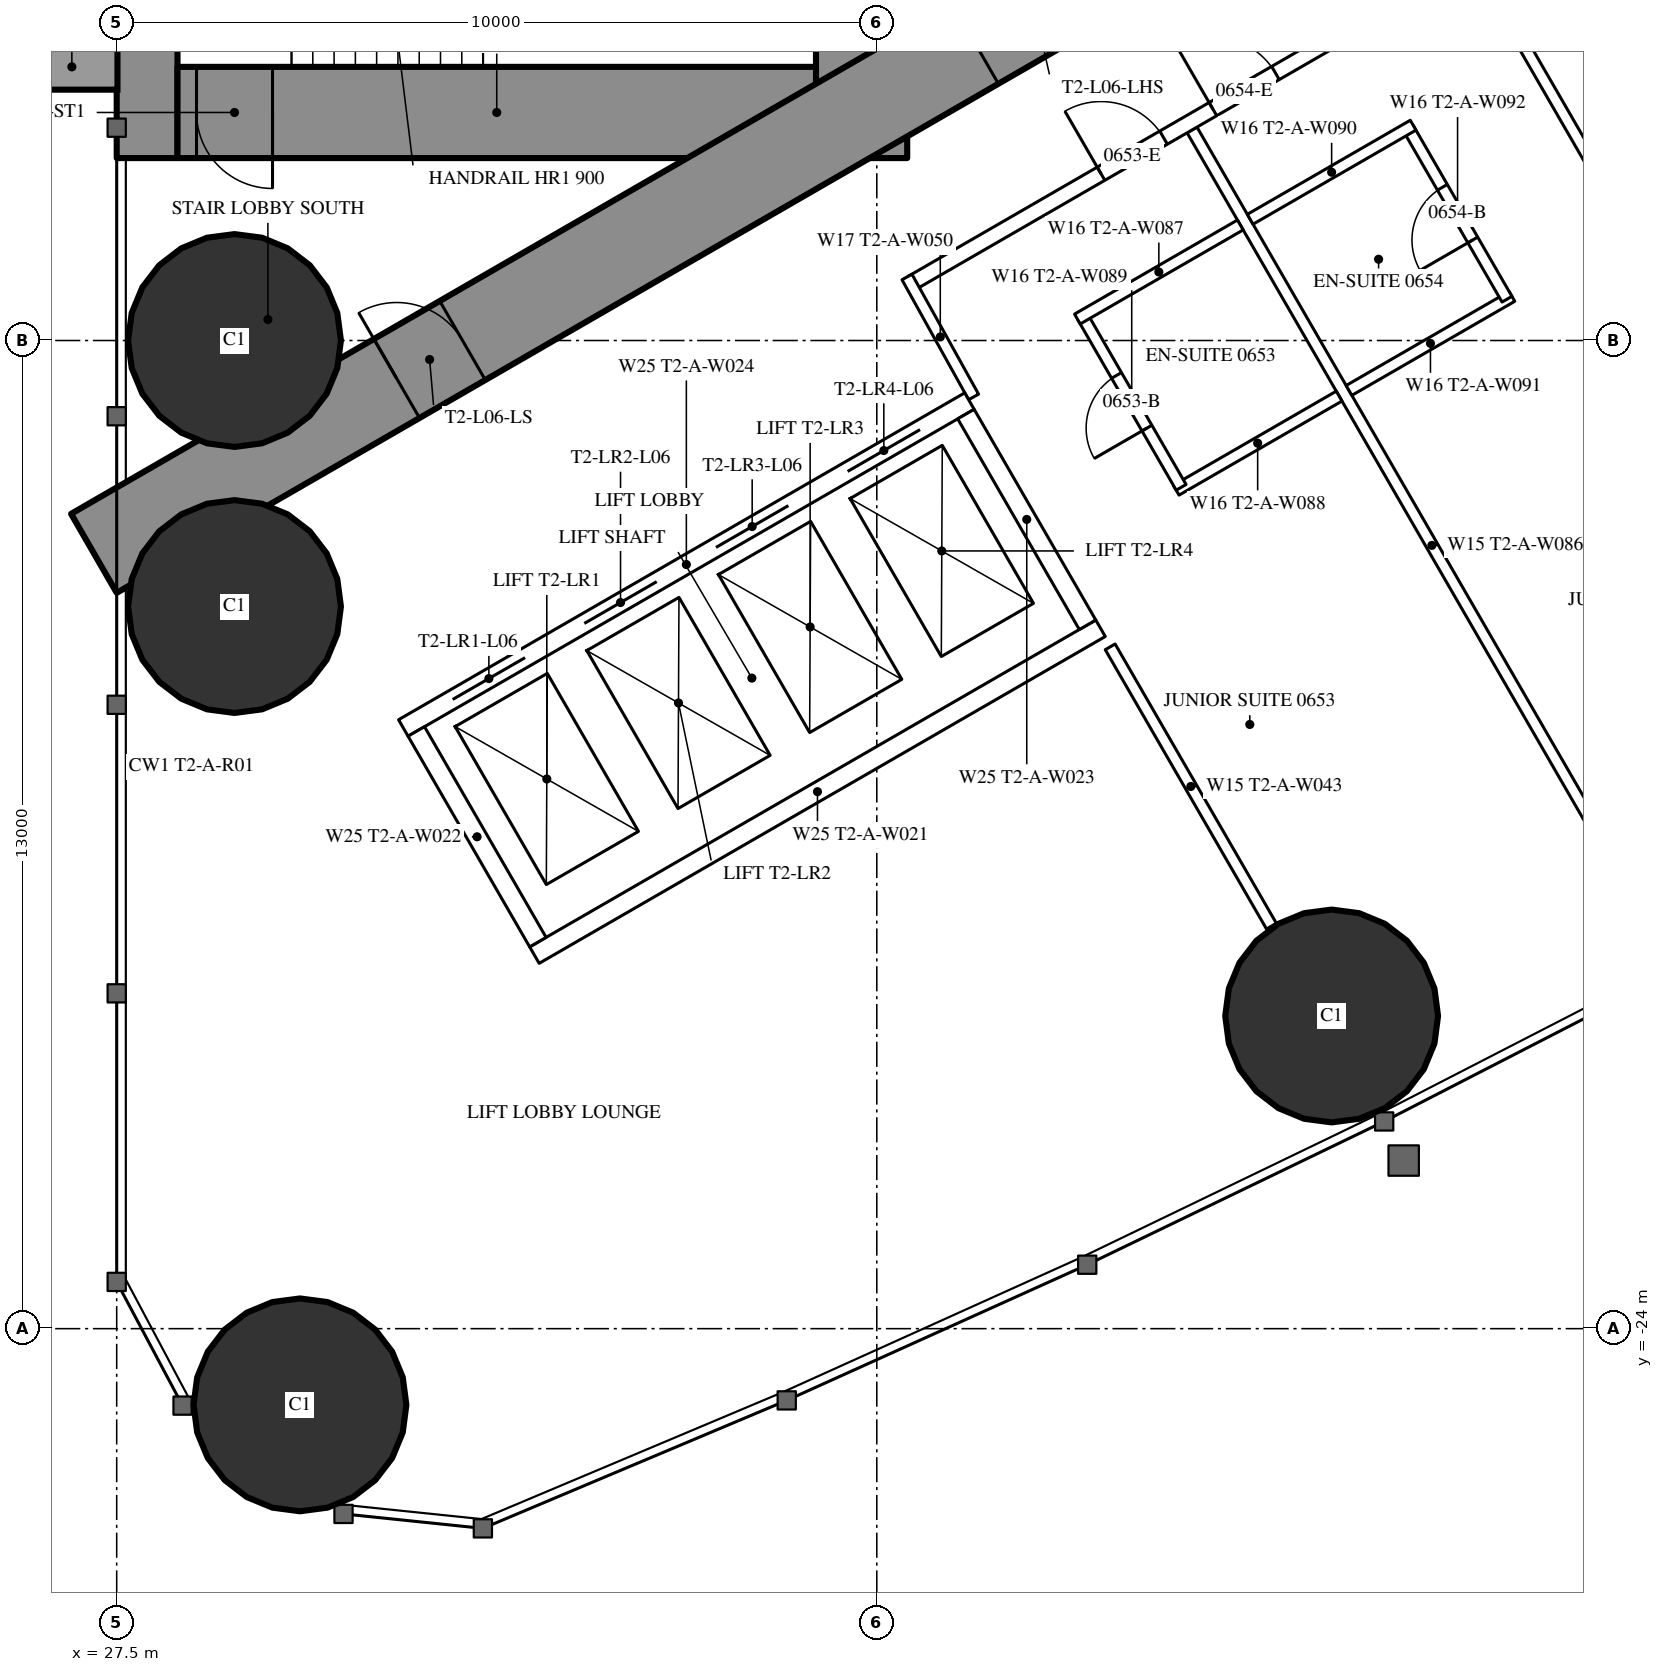
"""IFC4 building model, lengths in metres.
Left out: names, types, materials, properties, quantities, classifications, styles, units other than length and angle.
Written with IfcOpenShell. Run it as: python <this file> out.ifc"""

import sys

from ifc_helpers import new_model, si_unit, direction, frame, frame_2d, origin, origin_2d, place, context, subcontext, project, spatial, rectangle, hollow_circle, extrude, element, fill, save


model = new_model("IFC4")
c1 = context("Model", 3, precision=1e-05, world=origin(), true_north=direction((0.0, 1.0)))
c2 = subcontext(c1, "Body", "Model", "MODEL_VIEW")
j1 = project(units=[si_unit("LENGTHUNIT", "METRE"), si_unit("PLANEANGLEUNIT", "RADIAN")], contexts=[c1])
p1 = place(None, origin())
s1 = spatial("IfcSite", under=j1, at=p1, CompositionType="ELEMENT")
p2 = place(p1, origin())
s2 = spatial("IfcBuilding", under=s1, at=p2, CompositionType="ELEMENT")
p3 = place(p2, frame((0.0, 0.0, 28.5)))
s3 = spatial("IfcBuildingStorey", under=s2, at=p3, CompositionType="ELEMENT", Elevation=28.5)
for number, where, z_axis, x_axis in (
    (1, (29.911, -25.002, 0.0), (0.0, 0.0, 1.0), (1.0, 0.0, 0.0)),
    (2, (29.05, -11.0, 0.0), (0.0, 0.0, 1.0), (1.0, 0.0, 0.0)),
    (3, (29.05, -14.5, 0.0), (0.0, 0.0, 1.0), (1.0, 0.0, 0.0)),
    (4, (43.484, -19.886, 0.0), (0.0, 0.0, 1.0), (1.0, 0.0, 0.0)),
):
    element("IfcColumn", number, at=place(p3, frame(where, z_axis=z_axis, x_axis=x_axis)), inside=s3, PredefinedType="COLUMN", context=c2, shape_type="SweptSolid", body=[
        extrude(hollow_circle(Radius=1.4, WallThickness=0.12, at=origin_2d()), origin(), (0.0, 0.0, 1.0), 3.5),
    ])
p4 = place(p3, frame((27.9, -8.6, 0.0), z_axis=(0.0, 0.0, 1.0), x_axis=(0.0, 1.0, 0.0)))
e5 = element("IfcWall", 5, at=p4, inside=s3, PredefinedType="SHEAR", context=c2, shape_type="SweptSolid", body=[
    extrude(rectangle(XDim=17.2, YDim=0.8, at=frame_2d((8.6, 0.0))), origin(), (0.0, 0.0, 1.0), 3.5),
])
p5 = place(p4, frame((2.45, 0.0, 0.6)))
e6 = element("IfcOpeningElement", 6, at=p5, cuts=e5, PredefinedType="OPENING", context=c2, shape_type="SweptSolid", body=[
    extrude(rectangle(XDim=0.6, YDim=2.1, at=frame_2d((0.3, 1.05))), frame((0.0, 0.41, 0.0), z_axis=(0.0, -1.0, 0.0), x_axis=(1.0, 0.0, 0.0)), (0.0, 0.0, 1.0), 0.82),
])
p6 = place(p4, frame((14.15, 0.0, 0.6)))
e7 = element("IfcOpeningElement", 7, at=p6, cuts=e5, PredefinedType="OPENING", context=c2, shape_type="SweptSolid", body=[
    extrude(rectangle(XDim=0.6, YDim=2.1, at=frame_2d((0.3, 1.05))), frame((0.0, 0.41, 0.0), z_axis=(0.0, -1.0, 0.0), x_axis=(1.0, 0.0, 0.0)), (0.0, 0.0, 1.0), 0.82),
])
p7 = place(p3, frame((37.3, -8.6, 0.0), z_axis=(0.0, 0.0, 1.0), x_axis=(0.0, 1.0, 0.0)))
e8 = element("IfcWall", 8, at=p7, inside=s3, PredefinedType="SHEAR", context=c2, shape_type="SweptSolid", body=[
    extrude(rectangle(XDim=17.2, YDim=1.2, at=frame_2d((8.6, 0.0))), origin(), (0.0, 0.0, 1.0), 3.5),
])
p8 = place(p7, frame((7.7, 0.0, 0.0)))
e9 = element("IfcOpeningElement", 9, at=p8, cuts=e8, PredefinedType="OPENING", context=c2, shape_type="SweptSolid", body=[
    extrude(rectangle(XDim=1.8, YDim=2.2, at=frame_2d((0.9, 1.1))), frame((0.0, 0.61, 0.0), z_axis=(0.0, -1.0, 0.0), x_axis=(1.0, 0.0, 0.0)), (0.0, 0.0, 1.0), 1.22),
])
p9 = place(p3, frame((28.3, -8.0, 0.0), z_axis=(0.0, 0.0, 1.0), x_axis=(1.0, 0.0, 0.0)))
e10 = element("IfcWall", 10, at=p9, inside=s3, PredefinedType="SHEAR", context=c2, shape_type="SweptSolid", body=[
    extrude(rectangle(XDim=8.4, YDim=1.2, at=frame_2d((4.2, 0.0))), origin(), (0.0, 0.0, 1.0), 3.5),
])
p10 = place(p9, frame((0.25, 0.0, 0.0)))
e11 = element("IfcOpeningElement", 11, at=p10, cuts=e10, PredefinedType="OPENING", context=c2, shape_type="SweptSolid", body=[
    extrude(rectangle(XDim=1.0, YDim=2.2, at=frame_2d((0.5, 1.1))), frame((0.0, 0.61, 0.0), z_axis=(0.0, -1.0, 0.0), x_axis=(1.0, 0.0, 0.0)), (0.0, 0.0, 1.0), 1.22),
])
p11 = place(p3, frame((27.2, -13.8, 0.0), z_axis=(0.0, 0.0, 1.0), x_axis=(0.866027159892, 0.499996958321, 0.0)))
e12 = element("IfcWall", 12, at=p11, inside=s3, PredefinedType="SHEAR", context=c2, shape_type="SweptSolid", body=[
    extrude(rectangle(XDim=27.947, YDim=1.2, at=frame_2d((13.973, 0.0))), origin(), (0.0, 0.0, 1.0), 3.5),
])
p12 = place(p11, frame((4.6, 0.0, 0.0)))
e13 = element("IfcOpeningElement", 13, at=p12, cuts=e12, PredefinedType="OPENING", context=c2, shape_type="SweptSolid", body=[
    extrude(rectangle(XDim=1.0, YDim=2.2, at=frame_2d((0.5, 1.1))), frame((0.0, 0.61, 0.0), z_axis=(0.0, -1.0, 0.0), x_axis=(1.0, 0.0, 0.0)), (0.0, 0.0, 1.0), 1.22),
])
p13 = place(p11, frame((13.395, 0.0, 0.0)))
e14 = element("IfcOpeningElement", 14, at=p13, cuts=e12, PredefinedType="OPENING", context=c2, shape_type="SweptSolid", body=[
    extrude(rectangle(XDim=1.8, YDim=2.2, at=frame_2d((0.9, 1.1))), frame((0.0, 0.61, 0.0), z_axis=(0.0, -1.0, 0.0), x_axis=(1.0, 0.0, 0.0)), (0.0, 0.0, 1.0), 1.22),
])
p14 = place(p3, frame((41.647, -8.23, 0.0), z_axis=(0.0, 0.0, 1.0), x_axis=(0.49998590462, -0.866033541603, 0.0)))
e15 = element("IfcWall", 15, at=p14, inside=s3, PredefinedType="PARTITIONING", context=c2, shape_type="SweptSolid", body=[
    extrude(rectangle(XDim=12.621, YDim=0.15, at=frame_2d((6.311, 0.0))), origin(), (0.0, 0.0, 1.0), 3.25),
])
p15 = place(p3, frame((45.403, -6.062, 0.0), z_axis=(0.0, 0.0, 1.0), x_axis=(0.500007077968, -0.866021317279, 0.0)))
e16 = element("IfcWall", 16, at=p15, inside=s3, PredefinedType="PARTITIONING", context=c2, shape_type="SweptSolid", body=[
    extrude(rectangle(XDim=12.721, YDim=0.15, at=frame_2d((6.361, 0.0))), origin(), (0.0, 0.0, 1.0), 3.25),
])
p16 = place(p3, frame((40.57, -15.03, 0.0), z_axis=(0.0, 0.0, 1.0), x_axis=(0.500012993597, -0.866017901798, 0.0)))
e17 = element("IfcWall", 17, at=p16, inside=s3, PredefinedType="PARTITIONING", context=c2, shape_type="SweptSolid", body=[
    extrude(rectangle(XDim=4.243, YDim=0.15, at=frame_2d((2.122, 0.0))), origin(), (0.0, 0.0, 1.0), 3.25),
])
p17 = place(p3, frame((37.96, -10.243, 0.0), z_axis=(0.0, 0.0, 1.0), x_axis=(0.866026429433, 0.499998223521, 0.0)))
e18 = element("IfcWall", 18, at=p17, inside=s3, PredefinedType="PARTITIONING", context=c2, shape_type="SweptSolid", body=[
    extrude(rectangle(XDim=20.487, YDim=0.2, at=frame_2d((10.243, 0.0))), origin(), (0.0, 0.0, 1.0), 3.25),
])
p18 = place(p17, frame((4.575, 0.0, 0.0)))
e19 = element("IfcOpeningElement", 19, at=p18, cuts=e18, PredefinedType="OPENING", context=c2, shape_type="SweptSolid", body=[
    extrude(rectangle(XDim=0.95, YDim=2.2, at=frame_2d((0.475, 1.1))), frame((0.0, 0.11, 0.0), z_axis=(0.0, -1.0, 0.0), x_axis=(1.0, 0.0, 0.0)), (0.0, 0.0, 1.0), 0.22),
])
p19 = place(p17, frame((9.199, 0.0, 0.0)))
e20 = element("IfcOpeningElement", 20, at=p19, cuts=e18, PredefinedType="OPENING", context=c2, shape_type="SweptSolid", body=[
    extrude(rectangle(XDim=0.95, YDim=2.2, at=frame_2d((0.475, 1.1))), frame((0.0, 0.11, 0.0), z_axis=(0.0, -1.0, 0.0), x_axis=(1.0, 0.0, 0.0)), (0.0, 0.0, 1.0), 0.22),
])
p20 = place(p17, frame((15.599, 0.0, 0.0)))
e21 = element("IfcOpeningElement", 21, at=p20, cuts=e18, PredefinedType="OPENING", context=c2, shape_type="SweptSolid", body=[
    extrude(rectangle(XDim=0.95, YDim=2.2, at=frame_2d((0.475, 1.1))), frame((0.0, 0.11, 0.0), z_axis=(0.0, -1.0, 0.0), x_axis=(1.0, 0.0, 0.0)), (0.0, 0.0, 1.0), 0.22),
])
p21 = place(p17, frame((2.875, 0.0, 0.0)))
e22 = element("IfcOpeningElement", 22, at=p21, cuts=e18, PredefinedType="OPENING", context=c2, shape_type="SweptSolid", body=[
    extrude(rectangle(XDim=0.95, YDim=2.2, at=frame_2d((0.475, 1.1))), frame((0.0, 0.11, 0.0), z_axis=(0.0, -1.0, 0.0), x_axis=(1.0, 0.0, 0.0)), (0.0, 0.0, 1.0), 0.22),
])
p22 = place(p3, frame((38.773, -11.742, 0.0), z_axis=(0.0, 0.0, 1.0), x_axis=(-0.485528096672, 0.8742210632, 0.0)))
e23 = element("IfcWall", 23, at=p22, inside=s3, PredefinedType="PARTITIONING", context=c2, shape_type="SweptSolid", body=[
    extrude(rectangle(XDim=1.805, YDim=0.15, at=frame_2d((0.903, 0.0))), origin(), (0.0, 0.0, 1.0), 3.25),
])
p23 = place(p3, frame((43.712, -11.657, 0.0), z_axis=(0.0, 0.0, 1.0), x_axis=(0.866006523861, 0.500032699561, 0.0)))
e24 = element("IfcWall", 24, at=p23, inside=s3, PredefinedType="PARTITIONING", context=c2, shape_type="SweptSolid", body=[
    extrude(rectangle(XDim=2.475, YDim=0.15, at=frame_2d((1.237, 0.0))), origin(), (0.0, 0.0, 1.0), 3.25),
])
p24 = place(p3, frame((44.491, -8.205, 0.0), z_axis=(0.0, 0.0, 1.0), x_axis=(0.500047596559, -0.865997922154, 0.0)))
e25 = element("IfcWall", 25, at=p24, inside=s3, PredefinedType="PARTITIONING", context=c2, shape_type="SweptSolid", body=[
    extrude(rectangle(XDim=2.6, YDim=0.15, at=frame_2d((1.3, 0.0))), origin(), (0.0, 0.0, 1.0), 3.25),
])
p25 = place(p24, frame((0.9, 0.0, 0.0)))
e26 = element("IfcOpeningElement", 26, at=p25, cuts=e25, PredefinedType="OPENING", context=c2, shape_type="SweptSolid", body=[
    extrude(rectangle(XDim=0.8, YDim=2.2, at=frame_2d((0.4, 1.1))), frame((0.0, 0.085, 0.0), z_axis=(0.0, -1.0, 0.0), x_axis=(1.0, 0.0, 0.0)), (0.0, 0.0, 1.0), 0.17),
])
p26 = place(p3, frame((42.412, -9.405, 0.0), z_axis=(0.0, 0.0, 1.0), x_axis=(0.866006523861, 0.500032699561, 0.0)))
e27 = element("IfcWall", 27, at=p26, inside=s3, PredefinedType="PARTITIONING", context=c2, shape_type="SweptSolid", body=[
    extrude(rectangle(XDim=2.475, YDim=0.15, at=frame_2d((1.237, 0.0))), origin(), (0.0, 0.0, 1.0), 3.25),
])
p27 = place(p3, frame((41.439, -12.969, 0.0), z_axis=(0.0, 0.0, 1.0), x_axis=(0.866031185235, 0.4999899861, 0.0)))
e28 = element("IfcWall", 28, at=p27, inside=s3, PredefinedType="PARTITIONING", context=c2, shape_type="SweptSolid", body=[
    extrude(rectangle(XDim=2.475, YDim=0.15, at=frame_2d((1.238, 0.0))), origin(), (0.0, 0.0, 1.0), 3.25),
])
p28 = place(p3, frame((40.204, -10.68, 0.0), z_axis=(0.0, 0.0, 1.0), x_axis=(0.500006934395, -0.866021400173, 0.0)))
e29 = element("IfcWall", 29, at=p28, inside=s3, PredefinedType="PARTITIONING", context=c2, shape_type="SweptSolid", body=[
    extrude(rectangle(XDim=2.6, YDim=0.15, at=frame_2d((1.3, 0.0))), origin(), (0.0, 0.0, 1.0), 3.25),
])
p29 = place(p28, frame((0.9, 0.0, 0.0)))
e30 = element("IfcOpeningElement", 30, at=p29, cuts=e29, PredefinedType="OPENING", context=c2, shape_type="SweptSolid", body=[
    extrude(rectangle(XDim=0.8, YDim=2.2, at=frame_2d((0.4, 1.1))), frame((0.0, 0.085, 0.0), z_axis=(0.0, -1.0, 0.0), x_axis=(1.0, 0.0, 0.0)), (0.0, 0.0, 1.0), 0.17),
])
p30 = place(p3, frame((40.139, -10.718, 0.0), z_axis=(0.0, 0.0, 1.0), x_axis=(0.866031185235, 0.4999899861, 0.0)))
e31 = element("IfcWall", 31, at=p30, inside=s3, PredefinedType="PARTITIONING", context=c2, shape_type="SweptSolid", body=[
    extrude(rectangle(XDim=2.475, YDim=0.15, at=frame_2d((1.238, 0.0))), origin(), (0.0, 0.0, 1.0), 3.25),
])
p31 = place(p3, frame((31.271, -16.097, 0.0), z_axis=(0.0, 0.0, 1.0), x_axis=(0.86604045752, 0.499973925258, 0.0)))
e32 = element("IfcWall", 32, at=p31, inside=s3, PredefinedType="PARTITIONING", context=c2, shape_type="SweptSolid", body=[
    extrude(rectangle(XDim=8.6, YDim=0.25, at=frame_2d((4.3, 0.0))), origin(), (0.0, 0.0, 1.0), 3.25),
])
p32 = place(p31, frame((0.75, 0.0, 0.0)))
e33 = element("IfcOpeningElement", 33, at=p32, cuts=e32, PredefinedType="OPENING", context=c2, shape_type="SweptSolid", body=[
    extrude(rectangle(XDim=1.1, YDim=2.2, at=frame_2d((0.55, 1.1))), frame((0.0, 0.135, 0.0), z_axis=(0.0, -1.0, 0.0), x_axis=(1.0, 0.0, 0.0)), (0.0, 0.0, 1.0), 0.27),
])
p33 = place(p31, frame((2.75, 0.0, 0.0)))
e34 = element("IfcOpeningElement", 34, at=p33, cuts=e32, PredefinedType="OPENING", context=c2, shape_type="SweptSolid", body=[
    extrude(rectangle(XDim=1.1, YDim=2.2, at=frame_2d((0.55, 1.1))), frame((0.0, 0.135, 0.0), z_axis=(0.0, -1.0, 0.0), x_axis=(1.0, 0.0, 0.0)), (0.0, 0.0, 1.0), 0.27),
])
p34 = place(p31, frame((4.75, 0.0, 0.0)))
e35 = element("IfcOpeningElement", 35, at=p34, cuts=e32, PredefinedType="OPENING", context=c2, shape_type="SweptSolid", body=[
    extrude(rectangle(XDim=1.1, YDim=2.2, at=frame_2d((0.55, 1.1))), frame((0.0, 0.135, 0.0), z_axis=(0.0, -1.0, 0.0), x_axis=(1.0, 0.0, 0.0)), (0.0, 0.0, 1.0), 0.27),
])
p35 = place(p31, frame((6.75, 0.0, 0.0)))
e36 = element("IfcOpeningElement", 36, at=p35, cuts=e32, PredefinedType="OPENING", context=c2, shape_type="SweptSolid", body=[
    extrude(rectangle(XDim=1.1, YDim=2.2, at=frame_2d((0.55, 1.1))), frame((0.0, 0.135, 0.0), z_axis=(0.0, -1.0, 0.0), x_axis=(1.0, 0.0, 0.0)), (0.0, 0.0, 1.0), 0.27),
])
p36 = place(p3, frame((32.996, -19.086, 0.0), z_axis=(0.0, 0.0, 1.0), x_axis=(0.866028165386, 0.499995216735, 0.0)))
e37 = element("IfcWall", 37, at=p36, inside=s3, PredefinedType="PARTITIONING", context=c2, shape_type="SweptSolid", body=[
    extrude(rectangle(XDim=8.6, YDim=0.25, at=frame_2d((4.3, 0.0))), origin(), (0.0, 0.0, 1.0), 3.25),
])
for number, where, z_axis, x_axis in (
    (38, (31.441, -16.143, 0.0), (0.0, 0.0, 1.0), (0.5, -0.866, 0.0)),
    (39, (38.673, -11.968, 0.0), (0.0, 0.0, 1.0), (0.5, -0.866, 0.0)),
):
    element("IfcWall", number, at=place(p3, frame(where, z_axis=z_axis, x_axis=x_axis)), inside=s3, PredefinedType="PARTITIONING", context=c2, shape_type="SweptSolid", body=[
        extrude(rectangle(XDim=3.201, YDim=0.25, at=frame_2d((1.6, 0.0))), origin(), (0.0, 0.0, 1.0), 3.25),
    ])
p37 = place(p25, origin())
e40 = element("IfcDoor", 40, at=p37, inside=s3, OperationType="SINGLE_SWING_RIGHT", PredefinedType="DOOR", context=c2, shape_type="SweptSolid", body=[
    extrude(rectangle(XDim=0.8, YDim=2.2, at=frame_2d((0.4, 1.1))), frame((0.0, 0.025, 0.0), z_axis=(0.0, -1.0, 0.0), x_axis=(1.0, 0.0, 0.0)), (0.0, 0.0, 1.0), 0.05),
])
fill(e26, e40)
p38 = place(p18, origin())
e41 = element("IfcDoor", 41, at=p38, inside=s3, OperationType="SINGLE_SWING_LEFT", PredefinedType="DOOR", context=c2, shape_type="SweptSolid", body=[
    extrude(rectangle(XDim=0.95, YDim=2.2, at=frame_2d((0.475, 1.1))), frame((0.0, 0.025, 0.0), z_axis=(0.0, -1.0, 0.0), x_axis=(1.0, 0.0, 0.0)), (0.0, 0.0, 1.0), 0.05),
])
fill(e19, e41)
p39 = place(p29, origin())
e42 = element("IfcDoor", 42, at=p39, inside=s3, OperationType="SINGLE_SWING_RIGHT", PredefinedType="DOOR", context=c2, shape_type="SweptSolid", body=[
    extrude(rectangle(XDim=0.8, YDim=2.2, at=frame_2d((0.4, 1.1))), frame((0.0, 0.025, 0.0), z_axis=(0.0, -1.0, 0.0), x_axis=(1.0, 0.0, 0.0)), (0.0, 0.0, 1.0), 0.05),
])
fill(e30, e42)
p40 = place(p21, origin())
e43 = element("IfcDoor", 43, at=p40, inside=s3, OperationType="SINGLE_SWING_LEFT", PredefinedType="DOOR", context=c2, shape_type="SweptSolid", body=[
    extrude(rectangle(XDim=0.95, YDim=2.2, at=frame_2d((0.475, 1.1))), frame((0.0, 0.025, 0.0), z_axis=(0.0, -1.0, 0.0), x_axis=(1.0, 0.0, 0.0)), (0.0, 0.0, 1.0), 0.05),
])
fill(e22, e43)
p41 = place(p12, origin())
e44 = element("IfcDoor", 44, at=p41, inside=s3, OperationType="SINGLE_SWING_LEFT", PredefinedType="DOOR", context=c2, shape_type="SweptSolid", body=[
    extrude(rectangle(XDim=1.0, YDim=2.2, at=frame_2d((0.5, 1.1))), frame((0.0, 0.025, 0.0), z_axis=(0.0, -1.0, 0.0), x_axis=(1.0, 0.0, 0.0)), (0.0, 0.0, 1.0), 0.05),
])
fill(e13, e44)
p42 = place(p10, origin())
e45 = element("IfcDoor", 45, at=p42, inside=s3, OperationType="SINGLE_SWING_RIGHT", PredefinedType="DOOR", context=c2, shape_type="SweptSolid", body=[
    extrude(rectangle(XDim=1.0, YDim=2.2, at=frame_2d((0.5, 1.1))), frame((0.0, 0.025, 0.0), z_axis=(0.0, -1.0, 0.0), x_axis=(1.0, 0.0, 0.0)), (0.0, 0.0, 1.0), 0.05),
])
fill(e11, e45)
p43 = place(p32, origin())
e46 = element("IfcDoor", 46, at=p43, inside=s3, OperationType="DOUBLE_DOOR_SLIDING", PredefinedType="USERDEFINED", context=c2, shape_type="SweptSolid", body=[
    extrude(rectangle(XDim=1.1, YDim=2.2, at=frame_2d((0.55, 1.1))), frame((0.0, 0.025, 0.0), z_axis=(0.0, -1.0, 0.0), x_axis=(1.0, 0.0, 0.0)), (0.0, 0.0, 1.0), 0.05),
])
fill(e33, e46)
p44 = place(p33, origin())
e47 = element("IfcDoor", 47, at=p44, inside=s3, OperationType="DOUBLE_DOOR_SLIDING", PredefinedType="USERDEFINED", context=c2, shape_type="SweptSolid", body=[
    extrude(rectangle(XDim=1.1, YDim=2.2, at=frame_2d((0.55, 1.1))), frame((0.0, 0.025, 0.0), z_axis=(0.0, -1.0, 0.0), x_axis=(1.0, 0.0, 0.0)), (0.0, 0.0, 1.0), 0.05),
])
fill(e34, e47)
p45 = place(p34, origin())
e48 = element("IfcDoor", 48, at=p45, inside=s3, OperationType="DOUBLE_DOOR_SLIDING", PredefinedType="USERDEFINED", context=c2, shape_type="SweptSolid", body=[
    extrude(rectangle(XDim=1.1, YDim=2.2, at=frame_2d((0.55, 1.1))), frame((0.0, 0.025, 0.0), z_axis=(0.0, -1.0, 0.0), x_axis=(1.0, 0.0, 0.0)), (0.0, 0.0, 1.0), 0.05),
])
fill(e35, e48)
p46 = place(p35, origin())
e49 = element("IfcDoor", 49, at=p46, inside=s3, OperationType="DOUBLE_DOOR_SLIDING", PredefinedType="USERDEFINED", context=c2, shape_type="SweptSolid", body=[
    extrude(rectangle(XDim=1.1, YDim=2.2, at=frame_2d((0.55, 1.1))), frame((0.0, 0.025, 0.0), z_axis=(0.0, -1.0, 0.0), x_axis=(1.0, 0.0, 0.0)), (0.0, 0.0, 1.0), 0.05),
])
fill(e36, e49)
save(model, sys.argv[1])
